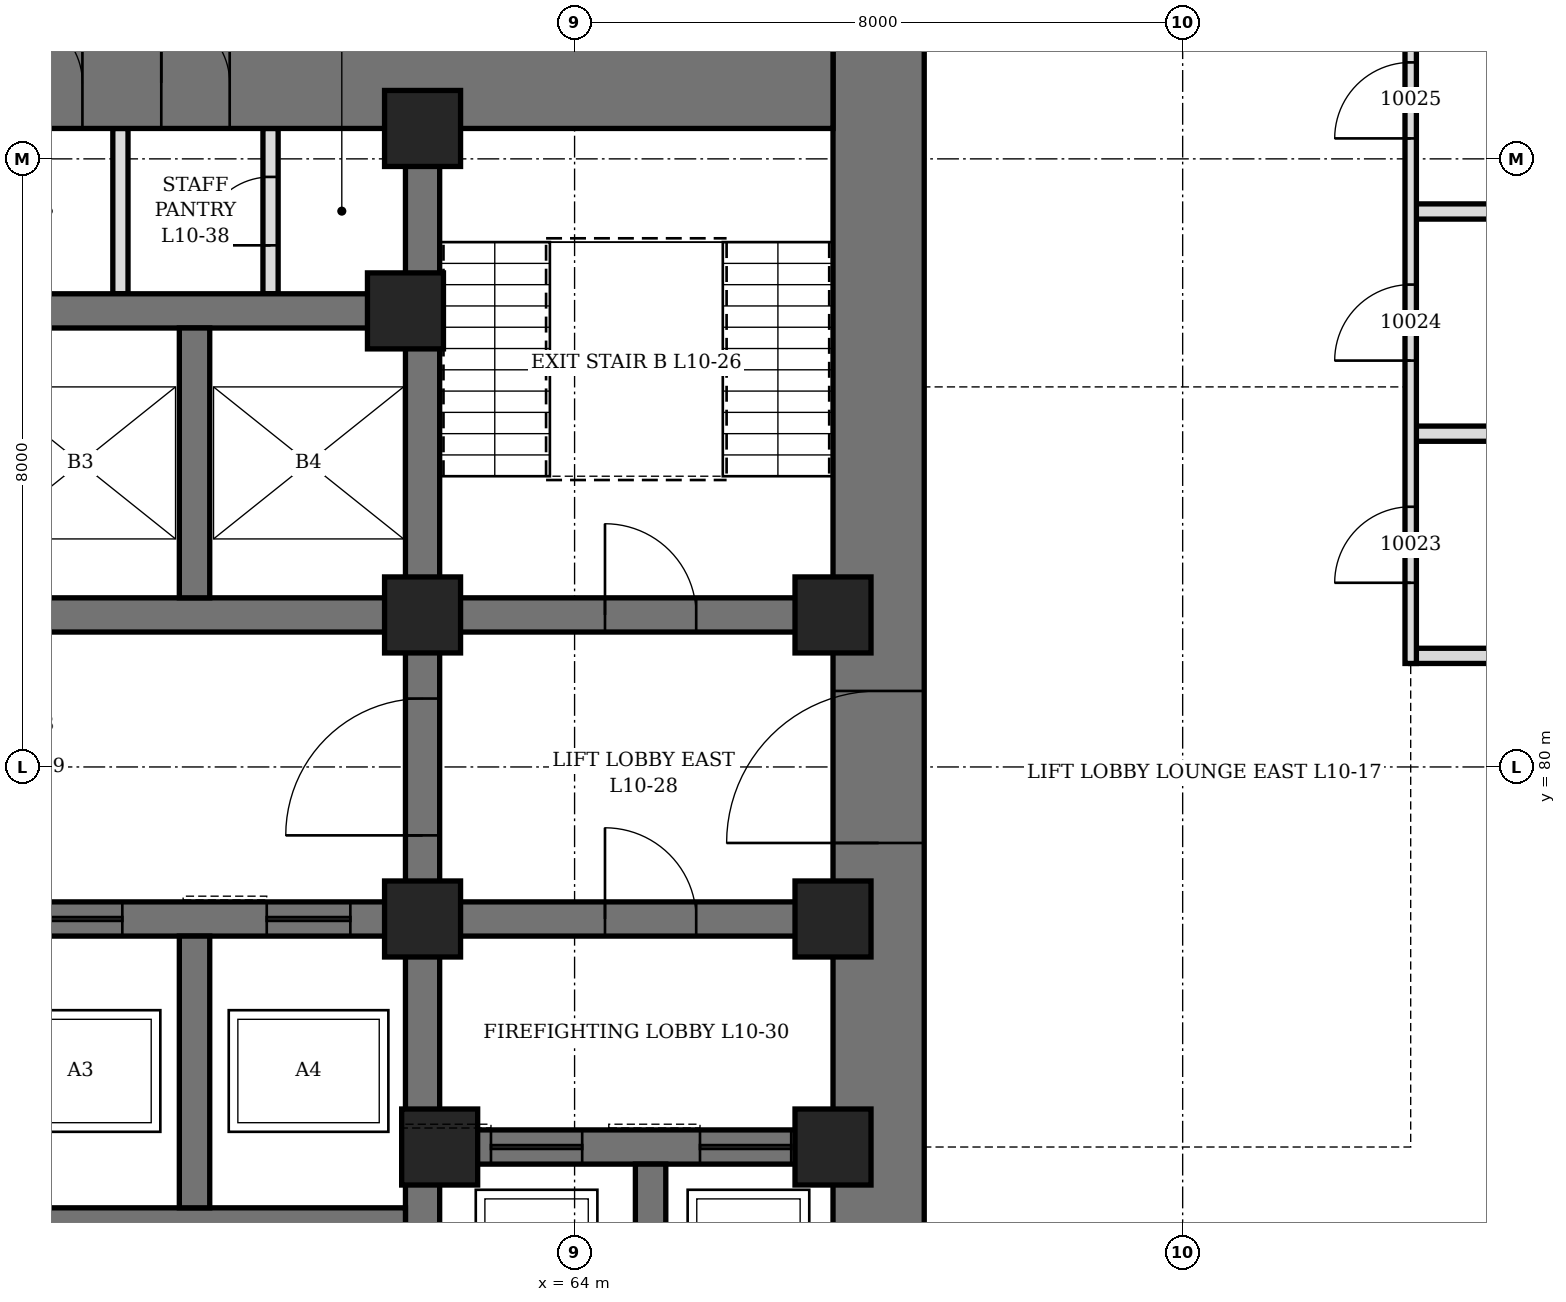
"""IFC4 building model, lengths in metres.
Left out: names, types, materials, properties, quantities, classifications, styles, units other than length and angle.
Written with IfcOpenShell. Run it as: python <this file> out.ifc"""

import sys

from ifc_helpers import new_model, si_unit, direction, frame, frame_2d, origin, origin_2d, place, context, subcontext, project, spatial, rectangle, hollow_rectangle, extrude, element, fill, save


model = new_model("IFC4")
c1 = context("Model", 3, precision=1e-05, world=origin(), true_north=direction((0.0, 1.0)))
c2 = subcontext(c1, "Body", "Model", "MODEL_VIEW")
j1 = project(units=[si_unit("LENGTHUNIT", "METRE"), si_unit("PLANEANGLEUNIT", "RADIAN")], contexts=[c1])
p1 = place(None, origin())
s1 = spatial("IfcSite", under=j1, at=p1, CompositionType="ELEMENT")
p2 = place(p1, origin())
s2 = spatial("IfcBuilding", under=s1, at=p2, CompositionType="ELEMENT")
p3 = place(p2, frame((0.0, 0.0, 51.7)))
s3 = spatial("IfcBuildingStorey", under=s2, at=p3, CompositionType="ELEMENT", Elevation=51.7)
p4 = place(p3, frame((68.0, 70.4, 0.0), z_axis=(0.0, 0.0, 1.0), x_axis=(0.0, 1.0, 0.0)))
e1 = element("IfcWall", 1, at=p4, inside=s3, PredefinedType="SHEAR", context=c2, shape_type="SweptSolid", body=[
    extrude(rectangle(XDim=19.2, YDim=1.2, at=frame_2d((9.6, 0.0))), origin(), (0.0, 0.0, 1.0), 4.2),
])
p5 = place(p4, frame((8.6, 0.0, 0.0)))
e2 = element("IfcOpeningElement", 2, at=p5, cuts=e1, PredefinedType="OPENING", context=c2, shape_type="SweptSolid", body=[
    extrude(rectangle(XDim=2.0, YDim=2.4, at=frame_2d((1.0, 1.2))), frame((0.0, 0.61, 0.0), z_axis=(0.0, -1.0, 0.0), x_axis=(1.0, 0.0, 0.0)), (0.0, 0.0, 1.0), 1.22),
])
p6 = place(p3, frame((44.6, 89.0, 0.0), z_axis=(0.0, 0.0, 1.0), x_axis=(1.0, 0.0, 0.0)))
e3 = element("IfcWall", 3, at=p6, inside=s3, PredefinedType="SHEAR", context=c2, shape_type="SweptSolid", body=[
    extrude(rectangle(XDim=22.8, YDim=1.2, at=frame_2d((11.4, 0.0))), origin(), (0.0, 0.0, 1.0), 4.2),
])
p7 = place(p6, frame((6.325, 0.0, 0.0)))
e4 = element("IfcOpeningElement", 4, at=p7, cuts=e3, PredefinedType="OPENING", context=c2, shape_type="SweptSolid", body=[
    extrude(rectangle(XDim=1.0, YDim=2.1, at=frame_2d((0.5, 1.05))), frame((0.0, 0.61, 0.0), z_axis=(0.0, -1.0, 0.0), x_axis=(1.0, 0.0, 0.0)), (0.0, 0.0, 1.0), 1.22),
])
p8 = place(p6, frame((9.25, 0.0, 0.0)))
e5 = element("IfcOpeningElement", 5, at=p8, cuts=e3, PredefinedType="OPENING", context=c2, shape_type="SweptSolid", body=[
    extrude(rectangle(XDim=0.9, YDim=2.1, at=frame_2d((0.45, 1.05))), frame((0.0, 0.61, 0.0), z_axis=(0.0, -1.0, 0.0), x_axis=(1.0, 0.0, 0.0)), (0.0, 0.0, 1.0), 1.22),
])
p9 = place(p6, frame((12.025, 0.0, 0.0)))
e6 = element("IfcOpeningElement", 6, at=p9, cuts=e3, PredefinedType="OPENING", context=c2, shape_type="SweptSolid", body=[
    extrude(rectangle(XDim=0.9, YDim=2.1, at=frame_2d((0.45, 1.05))), frame((0.0, 0.61, 0.0), z_axis=(0.0, -1.0, 0.0), x_axis=(1.0, 0.0, 0.0)), (0.0, 0.0, 1.0), 1.22),
])
p10 = place(p6, frame((13.962, 0.0, 0.0)))
e7 = element("IfcOpeningElement", 7, at=p10, cuts=e3, PredefinedType="OPENING", context=c2, shape_type="SweptSolid", body=[
    extrude(rectangle(XDim=0.9, YDim=2.1, at=frame_2d((0.45, 1.05))), frame((0.0, 0.61, 0.0), z_axis=(0.0, -1.0, 0.0), x_axis=(1.0, 0.0, 0.0)), (0.0, 0.0, 1.0), 1.22),
])
p11 = place(p3, frame((62.0, 71.6, 0.0), z_axis=(0.0, 0.0, 1.0), x_axis=(0.0, 1.0, 0.0)))
e8 = element("IfcWall", 8, at=p11, inside=s3, PredefinedType="SHEAR", context=c2, shape_type="SweptSolid", body=[
    extrude(rectangle(XDim=16.8, YDim=0.45, at=frame_2d((8.4, 0.0))), origin(), (0.0, 0.0, 1.0), 4.2),
])
p12 = place(p11, frame((7.5, 0.0, 0.0)))
e9 = element("IfcOpeningElement", 9, at=p12, cuts=e8, PredefinedType="OPENING", context=c2, shape_type="SweptSolid", body=[
    extrude(rectangle(XDim=1.8, YDim=2.4, at=frame_2d((0.9, 1.2))), frame((0.0, 0.235, 0.0), z_axis=(0.0, -1.0, 0.0), x_axis=(1.0, 0.0, 0.0)), (0.0, 0.0, 1.0), 0.47),
])
p13 = place(p3, frame((62.225, 75.0, 0.0), z_axis=(0.0, 0.0, 1.0), x_axis=(1.0, 0.0, 0.0)))
e10 = element("IfcWall", 10, at=p13, inside=s3, PredefinedType="SHEAR", context=c2, shape_type="SweptSolid", body=[
    extrude(rectangle(XDim=5.175, YDim=0.45, at=frame_2d((2.587, 0.0))), origin(), (0.0, 0.0, 1.0), 4.2),
])
p14 = place(p13, frame((0.675, 0.0, 0.0)))
e11 = element("IfcOpeningElement", 11, at=p14, cuts=e10, PredefinedType="OPENING", context=c2, shape_type="SweptSolid", body=[
    extrude(rectangle(XDim=1.2, YDim=2.2, at=frame_2d((0.6, 1.1))), frame((0.0, 0.235, 0.0), z_axis=(0.0, -1.0, 0.0), x_axis=(1.0, 0.0, 0.0)), (0.0, 0.0, 1.0), 0.47),
])
p15 = place(p13, frame((3.425, 0.0, 0.0)))
e12 = element("IfcOpeningElement", 12, at=p15, cuts=e10, PredefinedType="OPENING", context=c2, shape_type="SweptSolid", body=[
    extrude(rectangle(XDim=1.2, YDim=2.2, at=frame_2d((0.6, 1.1))), frame((0.0, 0.235, 0.0), z_axis=(0.0, -1.0, 0.0), x_axis=(1.0, 0.0, 0.0)), (0.0, 0.0, 1.0), 0.47),
])
p16 = place(p3, frame((62.225, 78.0, 0.0), z_axis=(0.0, 0.0, 1.0), x_axis=(1.0, 0.0, 0.0)))
e13 = element("IfcWall", 13, at=p16, inside=s3, PredefinedType="SHEAR", context=c2, shape_type="SweptSolid", body=[
    extrude(rectangle(XDim=5.175, YDim=0.45, at=frame_2d((2.587, 0.0))), origin(), (0.0, 0.0, 1.0), 4.2),
])
p17 = place(p16, frame((2.175, 0.0, 0.0)))
e14 = element("IfcOpeningElement", 14, at=p17, cuts=e13, PredefinedType="OPENING", context=c2, shape_type="SweptSolid", body=[
    extrude(rectangle(XDim=1.2, YDim=2.1, at=frame_2d((0.6, 1.05))), frame((0.0, 0.235, 0.0), z_axis=(0.0, -1.0, 0.0), x_axis=(1.0, 0.0, 0.0)), (0.0, 0.0, 1.0), 0.47),
])
p18 = place(p3, frame((62.225, 82.0, 0.0), z_axis=(0.0, 0.0, 1.0), x_axis=(1.0, 0.0, 0.0)))
e15 = element("IfcWall", 15, at=p18, inside=s3, PredefinedType="SHEAR", context=c2, shape_type="SweptSolid", body=[
    extrude(rectangle(XDim=5.175, YDim=0.45, at=frame_2d((2.587, 0.0))), origin(), (0.0, 0.0, 1.0), 4.2),
])
p19 = place(p18, frame((2.175, 0.0, 0.0)))
e16 = element("IfcOpeningElement", 16, at=p19, cuts=e15, PredefinedType="OPENING", context=c2, shape_type="SweptSolid", body=[
    extrude(rectangle(XDim=1.2, YDim=2.1, at=frame_2d((0.6, 1.05))), frame((0.0, 0.235, 0.0), z_axis=(0.0, -1.0, 0.0), x_axis=(1.0, 0.0, 0.0)), (0.0, 0.0, 1.0), 0.47),
])
p20 = place(p3, frame((50.225, 78.0, 0.0), z_axis=(0.0, 0.0, 1.0), x_axis=(1.0, 0.0, 0.0)))
e17 = element("IfcWall", 17, at=p20, inside=s3, PredefinedType="SHEAR", context=c2, shape_type="SweptSolid", body=[
    extrude(rectangle(XDim=11.55, YDim=0.45, at=frame_2d((5.775, 0.0))), origin(), (0.0, 0.0, 1.0), 4.2),
])
p21 = place(p20, frame((0.725, 0.0, 0.0)))
e18 = element("IfcOpeningElement", 18, at=p21, cuts=e17, PredefinedType="OPENING", context=c2, shape_type="SweptSolid", body=[
    extrude(rectangle(XDim=1.1, YDim=2.2, at=frame_2d((0.55, 1.1))), frame((0.0, 0.235, 0.0), z_axis=(0.0, -1.0, 0.0), x_axis=(1.0, 0.0, 0.0)), (0.0, 0.0, 1.0), 0.47),
])
p22 = place(p20, frame((3.725, 0.0, 0.0)))
e19 = element("IfcOpeningElement", 19, at=p22, cuts=e17, PredefinedType="OPENING", context=c2, shape_type="SweptSolid", body=[
    extrude(rectangle(XDim=1.1, YDim=2.2, at=frame_2d((0.55, 1.1))), frame((0.0, 0.235, 0.0), z_axis=(0.0, -1.0, 0.0), x_axis=(1.0, 0.0, 0.0)), (0.0, 0.0, 1.0), 0.47),
])
p23 = place(p20, frame((6.725, 0.0, 0.0)))
e20 = element("IfcOpeningElement", 20, at=p23, cuts=e17, PredefinedType="OPENING", context=c2, shape_type="SweptSolid", body=[
    extrude(rectangle(XDim=1.1, YDim=2.2, at=frame_2d((0.55, 1.1))), frame((0.0, 0.235, 0.0), z_axis=(0.0, -1.0, 0.0), x_axis=(1.0, 0.0, 0.0)), (0.0, 0.0, 1.0), 0.47),
])
p24 = place(p20, frame((9.725, 0.0, 0.0)))
e21 = element("IfcOpeningElement", 21, at=p24, cuts=e17, PredefinedType="OPENING", context=c2, shape_type="SweptSolid", body=[
    extrude(rectangle(XDim=1.1, YDim=2.2, at=frame_2d((0.55, 1.1))), frame((0.0, 0.235, 0.0), z_axis=(0.0, -1.0, 0.0), x_axis=(1.0, 0.0, 0.0)), (0.0, 0.0, 1.0), 0.47),
])
for number, where, z_axis, x_axis in (
    (22, (50.225, 82.0, 0.0), (0.0, 0.0, 1.0), (1.0, 0.0, 0.0)),
    (23, (50.225, 86.0, 0.0), (0.0, 0.0, 1.0), (1.0, 0.0, 0.0)),
):
    element("IfcWall", number, at=place(p3, frame(where, z_axis=z_axis, x_axis=x_axis)), inside=s3, PredefinedType="SHEAR", context=c2, shape_type="SweptSolid", body=[
        extrude(rectangle(XDim=11.55, YDim=0.45, at=frame_2d((5.775, 0.0))), origin(), (0.0, 0.0, 1.0), 4.2),
    ])
p25 = place(p3, frame((50.225, 74.0, 0.0), z_axis=(0.0, 0.0, 1.0), x_axis=(1.0, 0.0, 0.0)))
e24 = element("IfcWall", 24, at=p25, inside=s3, PredefinedType="SHEAR", context=c2, shape_type="SweptSolid", body=[
    extrude(rectangle(XDim=11.55, YDim=0.4, at=frame_2d((5.775, 0.0))), origin(), (0.0, 0.0, 1.0), 4.2),
])
p26 = place(p3, frame((59.0, 74.2, 0.0), z_axis=(0.0, 0.0, 1.0), x_axis=(0.0, 1.0, 0.0)))
e25 = element("IfcWall", 25, at=p26, inside=s3, PredefinedType="SHEAR", context=c2, shape_type="SweptSolid", body=[
    extrude(rectangle(XDim=3.575, YDim=0.4, at=frame_2d((1.788, 0.0))), origin(), (0.0, 0.0, 1.0), 4.2),
])
p27 = place(p3, frame((59.0, 82.225, 0.0), z_axis=(0.0, 0.0, 1.0), x_axis=(0.0, 1.0, 0.0)))
e26 = element("IfcWall", 26, at=p27, inside=s3, PredefinedType="SHEAR", context=c2, shape_type="SweptSolid", body=[
    extrude(rectangle(XDim=3.55, YDim=0.4, at=frame_2d((1.775, 0.0))), origin(), (0.0, 0.0, 1.0), 4.2),
])
p28 = place(p3, frame((65.0, 71.6, 0.0), z_axis=(0.0, 0.0, 1.0), x_axis=(0.0, 1.0, 0.0)))
e27 = element("IfcWall", 27, at=p28, inside=s3, PredefinedType="SHEAR", context=c2, shape_type="SweptSolid", body=[
    extrude(rectangle(XDim=3.175, YDim=0.4, at=frame_2d((1.587, 0.0))), origin(), (0.0, 0.0, 1.0), 4.2),
])
for number, where, z_axis, x_axis in (
    (28, (61.775, 86.0, 0.0), (0.0, 0.0, 1.0), (1.0, 0.0, 0.0)),
    (29, (62.0, 78.0, 0.0), (0.0, 0.0, 1.0), (1.0, 0.0, 0.0)),
    (30, (62.0, 82.0, 0.0), (0.0, 0.0, 1.0), (1.0, 0.0, 0.0)),
    (31, (62.0, 88.4, 0.0), (0.0, 0.0, 1.0), (1.0, 0.0, 0.0)),
    (32, (62.225, 75.0, 0.0), (0.0, 0.0, 1.0), (1.0, 0.0, 0.0)),
    (33, (67.4, 75.0, 0.0), (0.0, 0.0, 1.0), (1.0, 0.0, 0.0)),
    (34, (67.4, 78.0, 0.0), (0.0, 0.0, 1.0), (1.0, 0.0, 0.0)),
    (35, (67.4, 82.0, 0.0), (0.0, 0.0, 1.0), (1.0, 0.0, 0.0)),
):
    element("IfcColumn", number, at=place(p3, frame(where, z_axis=z_axis, x_axis=x_axis)), inside=s3, PredefinedType="COLUMN", context=c2, shape_type="SweptSolid", body=[
        extrude(hollow_rectangle(XDim=1.0, YDim=1.0, WallThickness=0.15, at=origin_2d()), origin(), (0.0, 0.0, 1.0), 4.2),
    ])
p29 = place(p3, frame((60.0, 86.225, 0.0), z_axis=(0.0, 0.0, 1.0), x_axis=(0.0, 1.0, 0.0)))
e36 = element("IfcWall", 36, at=p29, inside=s3, PredefinedType="PARTITIONING", context=c2, shape_type="SweptSolid", body=[
    extrude(rectangle(XDim=2.175, YDim=0.2, at=frame_2d((1.087, 0.0))), origin(), (0.0, 0.0, 1.0), 4.04),
])
p30 = place(p29, frame((0.637, 0.0, 0.0)))
e37 = element("IfcOpeningElement", 37, at=p30, cuts=e36, PredefinedType="OPENING", context=c2, shape_type="SweptSolid", body=[
    extrude(rectangle(XDim=0.9, YDim=2.1, at=frame_2d((0.45, 1.05))), frame((0.0, 0.11, 0.0), z_axis=(0.0, -1.0, 0.0), x_axis=(1.0, 0.0, 0.0)), (0.0, 0.0, 1.0), 0.22),
])
p31 = place(p3, frame((58.025, 86.225, 0.0), z_axis=(0.0, 0.0, 1.0), x_axis=(0.0, 1.0, 0.0)))
e38 = element("IfcWall", 38, at=p31, inside=s3, PredefinedType="PARTITIONING", context=c2, shape_type="SweptSolid", body=[
    extrude(rectangle(XDim=2.175, YDim=0.2, at=frame_2d((1.087, 0.0))), origin(), (0.0, 0.0, 1.0), 4.04),
])
for number, where, z_axis, x_axis in (
    (39, (75.0, 81.461, 0.0), (0.0, 0.0, 1.0), (1.0, 0.0, 0.0)),
    (40, (75.0, 84.385, 0.0), (0.0, 0.0, 1.0), (1.0, 0.0, 0.0)),
    (41, (75.0, 87.308, 0.0), (0.0, 0.0, 1.0), (1.0, 0.0, 0.0)),
):
    element("IfcWall", number, at=place(p3, frame(where, z_axis=z_axis, x_axis=x_axis)), inside=s3, PredefinedType="PARTITIONING", context=c2, shape_type="SweptSolid", body=[
        extrude(rectangle(XDim=4.5, YDim=0.2, at=frame_2d((2.25, 0.0))), origin(), (0.0, 0.0, 1.0), 3.428),
    ])
p32 = place(p3, frame((75.0, 81.362, 0.0), z_axis=(0.0, 0.0, 1.0), x_axis=(0.0, 1.0, 0.0)))
e42 = element("IfcWall", 42, at=p32, inside=s3, PredefinedType="PARTITIONING", context=c2, shape_type="SweptSolid", body=[
    extrude(rectangle(XDim=17.138, YDim=0.15, at=frame_2d((8.569, 0.0))), origin(), (0.0, 0.0, 1.0), 4.04),
])
p33 = place(p32, frame((1.062, 0.0, 0.0)))
e43 = element("IfcOpeningElement", 43, at=p33, cuts=e42, PredefinedType="OPENING", context=c2, shape_type="SweptSolid", body=[
    extrude(rectangle(XDim=1.0, YDim=2.1, at=frame_2d((0.5, 1.05))), frame((0.0, 0.085, 0.0), z_axis=(0.0, -1.0, 0.0), x_axis=(1.0, 0.0, 0.0)), (0.0, 0.0, 1.0), 0.17),
])
p34 = place(p32, frame((3.985, 0.0, 0.0)))
e44 = element("IfcOpeningElement", 44, at=p34, cuts=e42, PredefinedType="OPENING", context=c2, shape_type="SweptSolid", body=[
    extrude(rectangle(XDim=1.0, YDim=2.1, at=frame_2d((0.5, 1.05))), frame((0.0, 0.085, 0.0), z_axis=(0.0, -1.0, 0.0), x_axis=(1.0, 0.0, 0.0)), (0.0, 0.0, 1.0), 0.17),
])
p35 = place(p32, frame((6.908, 0.0, 0.0)))
e45 = element("IfcOpeningElement", 45, at=p35, cuts=e42, PredefinedType="OPENING", context=c2, shape_type="SweptSolid", body=[
    extrude(rectangle(XDim=1.0, YDim=2.1, at=frame_2d((0.5, 1.05))), frame((0.0, 0.085, 0.0), z_axis=(0.0, -1.0, 0.0), x_axis=(1.0, 0.0, 0.0)), (0.0, 0.0, 1.0), 0.17),
])
p36 = place(p32, frame((9.831, 0.0, 0.0)))
e46 = element("IfcOpeningElement", 46, at=p36, cuts=e42, PredefinedType="OPENING", context=c2, shape_type="SweptSolid", body=[
    extrude(rectangle(XDim=1.0, YDim=2.1, at=frame_2d((0.5, 1.05))), frame((0.0, 0.085, 0.0), z_axis=(0.0, -1.0, 0.0), x_axis=(1.0, 0.0, 0.0)), (0.0, 0.0, 1.0), 0.17),
])
p37 = place(p32, frame((12.754, 0.0, 0.0)))
e47 = element("IfcOpeningElement", 47, at=p37, cuts=e42, PredefinedType="OPENING", context=c2, shape_type="SweptSolid", body=[
    extrude(rectangle(XDim=1.0, YDim=2.1, at=frame_2d((0.5, 1.05))), frame((0.0, 0.085, 0.0), z_axis=(0.0, -1.0, 0.0), x_axis=(1.0, 0.0, 0.0)), (0.0, 0.0, 1.0), 0.17),
])
p38 = place(p32, frame((15.677, 0.0, 0.0)))
e48 = element("IfcOpeningElement", 48, at=p38, cuts=e42, PredefinedType="OPENING", context=c2, shape_type="SweptSolid", body=[
    extrude(rectangle(XDim=1.0, YDim=2.4, at=frame_2d((0.5, 1.2))), frame((0.0, 0.085, 0.0), z_axis=(0.0, -1.0, 0.0), x_axis=(1.0, 0.0, 0.0)), (0.0, 0.0, 1.0), 0.17),
])
p39 = place(p9, origin())
e49 = element("IfcDoor", 49, at=p39, inside=s3, OperationType="SINGLE_SWING_LEFT", PredefinedType="DOOR", context=c2, shape_type="SweptSolid", body=[
    extrude(rectangle(XDim=0.9, YDim=2.1, at=frame_2d((0.45, 1.05))), frame((0.0, 0.35, 0.0), z_axis=(0.0, -1.0, 0.0), x_axis=(1.0, 0.0, 0.0)), (0.0, 0.0, 1.0), 0.7),
])
fill(e6, e49)
p40 = place(p10, origin())
e50 = element("IfcDoor", 50, at=p40, inside=s3, OperationType="SINGLE_SWING_LEFT", PredefinedType="DOOR", context=c2, shape_type="SweptSolid", body=[
    extrude(rectangle(XDim=0.9, YDim=2.1, at=frame_2d((0.45, 1.05))), frame((0.0, 0.35, 0.0), z_axis=(0.0, -1.0, 0.0), x_axis=(1.0, 0.0, 0.0)), (0.0, 0.0, 1.0), 0.7),
])
fill(e7, e50)
p41 = place(p30, origin())
e51 = element("IfcDoor", 51, at=p41, inside=s3, OperationType="SINGLE_SWING_LEFT", PredefinedType="DOOR", context=c2, shape_type="SweptSolid", body=[
    extrude(rectangle(XDim=0.9, YDim=2.1, at=frame_2d((0.45, 1.05))), frame((0.0, 0.1, 0.0), z_axis=(0.0, -1.0, 0.0), x_axis=(1.0, 0.0, 0.0)), (0.0, 0.0, 1.0), 0.199),
])
fill(e37, e51)
p42 = place(p19, origin())
e52 = element("IfcDoor", 52, at=p42, inside=s3, OperationType="SINGLE_SWING_LEFT", PredefinedType="DOOR", context=c2, shape_type="SweptSolid", body=[
    extrude(rectangle(XDim=1.2, YDim=2.1, at=frame_2d((0.6, 1.05))), frame((0.0, 0.225, 0.0), z_axis=(0.0, -1.0, 0.0), x_axis=(1.0, 0.0, 0.0)), (0.0, 0.0, 1.0), 0.449),
])
fill(e16, e52)
p43 = place(p5, origin())
e53 = element("IfcDoor", 53, at=p43, inside=s3, OperationType="DOUBLE_DOOR_SINGLE_SWING", PredefinedType="DOOR", context=c2, shape_type="SweptSolid", body=[
    extrude(rectangle(XDim=2.0, YDim=2.4, at=frame_2d((1.0, 1.2))), frame((0.0, 0.35, 0.0), z_axis=(0.0, -1.0, 0.0), x_axis=(1.0, 0.0, 0.0)), (0.0, 0.0, 1.0), 0.7),
])
fill(e2, e53)
p44 = place(p12, origin())
e54 = element("IfcDoor", 54, at=p44, inside=s3, OperationType="DOUBLE_DOOR_SINGLE_SWING", PredefinedType="DOOR", context=c2, shape_type="SweptSolid", body=[
    extrude(rectangle(XDim=1.8, YDim=2.4, at=frame_2d((0.9, 1.2))), frame((0.0, 0.225, 0.0), z_axis=(0.0, -1.0, 0.0), x_axis=(1.0, 0.0, 0.0)), (0.0, 0.0, 1.0), 0.449),
])
fill(e9, e54)
p45 = place(p17, origin())
e55 = element("IfcDoor", 55, at=p45, inside=s3, OperationType="SINGLE_SWING_RIGHT", PredefinedType="DOOR", context=c2, shape_type="SweptSolid", body=[
    extrude(rectangle(XDim=1.2, YDim=2.1, at=frame_2d((0.6, 1.05))), frame((0.0, 0.225, 0.0), z_axis=(0.0, -1.0, 0.0), x_axis=(1.0, 0.0, 0.0)), (0.0, 0.0, 1.0), 0.449),
])
fill(e14, e55)
p46 = place(p23, origin())
e56 = element("IfcDoor", 56, at=p46, inside=s3, OperationType="SLIDING_TO_LEFT", PredefinedType="DOOR", context=c2, shape_type="SweptSolid", body=[
    extrude(rectangle(XDim=1.1, YDim=2.2, at=frame_2d((0.55, 1.1))), frame((0.0, 0.225, 0.0), z_axis=(0.0, -1.0, 0.0), x_axis=(1.0, 0.0, 0.0)), (0.0, 0.0, 1.0), 0.449),
])
fill(e20, e56)
p47 = place(p24, origin())
e57 = element("IfcDoor", 57, at=p47, inside=s3, OperationType="SLIDING_TO_LEFT", PredefinedType="DOOR", context=c2, shape_type="SweptSolid", body=[
    extrude(rectangle(XDim=1.1, YDim=2.2, at=frame_2d((0.55, 1.1))), frame((0.0, 0.225, 0.0), z_axis=(0.0, -1.0, 0.0), x_axis=(1.0, 0.0, 0.0)), (0.0, 0.0, 1.0), 0.449),
])
fill(e21, e57)
p48 = place(p14, origin())
e58 = element("IfcDoor", 58, at=p48, inside=s3, OperationType="SLIDING_TO_LEFT", PredefinedType="DOOR", context=c2, shape_type="SweptSolid", body=[
    extrude(rectangle(XDim=1.2, YDim=2.2, at=frame_2d((0.6, 1.1))), frame((0.0, 0.225, 0.0), z_axis=(0.0, -1.0, 0.0), x_axis=(1.0, 0.0, 0.0)), (0.0, 0.0, 1.0), 0.449),
])
fill(e11, e58)
p49 = place(p15, origin())
e59 = element("IfcDoor", 59, at=p49, inside=s3, OperationType="SLIDING_TO_LEFT", PredefinedType="DOOR", context=c2, shape_type="SweptSolid", body=[
    extrude(rectangle(XDim=1.2, YDim=2.2, at=frame_2d((0.6, 1.1))), frame((0.0, 0.225, 0.0), z_axis=(0.0, -1.0, 0.0), x_axis=(1.0, 0.0, 0.0)), (0.0, 0.0, 1.0), 0.449),
])
fill(e12, e59)
p50 = place(p33, origin())
e60 = element("IfcDoor", 60, at=p50, inside=s3, OperationType="SINGLE_SWING_LEFT", PredefinedType="DOOR", context=c2, shape_type="SweptSolid", body=[
    extrude(rectangle(XDim=1.0, YDim=2.1, at=frame_2d((0.5, 1.05))), frame((0.0, 0.075, 0.0), z_axis=(0.0, -1.0, 0.0), x_axis=(1.0, 0.0, 0.0)), (0.0, 0.0, 1.0), 0.149),
])
fill(e43, e60)
p51 = place(p34, origin())
e61 = element("IfcDoor", 61, at=p51, inside=s3, OperationType="SINGLE_SWING_LEFT", PredefinedType="DOOR", context=c2, shape_type="SweptSolid", body=[
    extrude(rectangle(XDim=1.0, YDim=2.1, at=frame_2d((0.5, 1.05))), frame((0.0, 0.075, 0.0), z_axis=(0.0, -1.0, 0.0), x_axis=(1.0, 0.0, 0.0)), (0.0, 0.0, 1.0), 0.149),
])
fill(e44, e61)
p52 = place(p35, origin())
e62 = element("IfcDoor", 62, at=p52, inside=s3, OperationType="SINGLE_SWING_LEFT", PredefinedType="DOOR", context=c2, shape_type="SweptSolid", body=[
    extrude(rectangle(XDim=1.0, YDim=2.1, at=frame_2d((0.5, 1.05))), frame((0.0, 0.075, 0.0), z_axis=(0.0, -1.0, 0.0), x_axis=(1.0, 0.0, 0.0)), (0.0, 0.0, 1.0), 0.149),
])
fill(e45, e62)
save(model, sys.argv[1])
